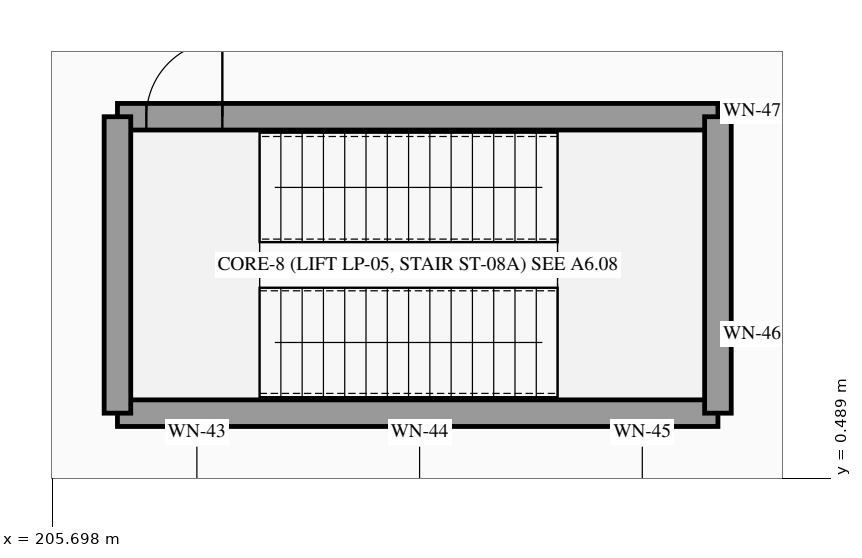
"""IFC4 building model, lengths in metres.
Left out: names, types, materials, properties, quantities, classifications, styles, units other than length and angle.
Written with IfcOpenShell. Run it as: python <this file> out.ifc"""

import sys

from ifc_helpers import new_model, si_unit, direction, frame, frame_2d, origin, place, context, subcontext, project, spatial, rectangle, extrude, element, fill, save


model = new_model("IFC4")
c1 = context("Model", 3, precision=1e-05, world=origin(), true_north=direction((0.0, 1.0)))
c2 = subcontext(c1, "Body", "Model", "MODEL_VIEW")
j1 = project(units=[si_unit("LENGTHUNIT", "METRE"), si_unit("PLANEANGLEUNIT", "RADIAN")], contexts=[c1])
p1 = place(None, origin())
s1 = spatial("IfcSite", under=j1, at=p1, CompositionType="ELEMENT")
p2 = place(p1, origin())
s2 = spatial("IfcBuilding", under=s1, at=p2, CompositionType="ELEMENT")
p3 = place(p2, origin())
s3 = spatial("IfcBuildingStorey", under=s2, at=p3, CompositionType="ELEMENT", Elevation=0.0)
p4 = place(p3, frame((206.55, 1.35, 0.0), z_axis=(0.0, 0.0, 1.0), x_axis=(1.0, 0.0, 0.0)))
e1 = element("IfcWall", 1, at=p4, inside=s3, PredefinedType="SHEAR", context=c2, shape_type="SweptSolid", body=[
    extrude(rectangle(XDim=7.9, YDim=0.35, at=frame_2d((3.95, 0.0))), origin(), (0.0, 0.0, 1.0), 5.4),
])
p5 = place(p3, frame((206.55, 5.25, 0.0), z_axis=(0.0, 0.0, 1.0), x_axis=(1.0, 0.0, 0.0)))
e2 = element("IfcWall", 2, at=p5, inside=s3, PredefinedType="SHEAR", context=c2, shape_type="SweptSolid", body=[
    extrude(rectangle(XDim=7.9, YDim=0.35, at=frame_2d((3.95, 0.0))), origin(), (0.0, 0.0, 1.0), 5.4),
])
p6 = place(p5, frame((0.38, 0.0, 0.0)))
e3 = element("IfcOpeningElement", 3, at=p6, cuts=e2, PredefinedType="OPENING", context=c2, shape_type="SweptSolid", body=[
    extrude(rectangle(XDim=1.0, YDim=2.15, at=frame_2d((0.5, 1.075))), frame((0.0, 0.185, 0.0), z_axis=(0.0, -1.0, 0.0), x_axis=(1.0, 0.0, 0.0)), (0.0, 0.0, 1.0), 0.37),
])
for number, where, z_axis, x_axis in (
    (4, (206.55, 1.35, 0.0), (0.0, 0.0, 1.0), (0.0, 1.0, 0.0)),
    (5, (214.45, 1.35, 0.0), (0.0, 0.0, 1.0), (0.0, 1.0, 0.0)),
):
    element("IfcWall", number, at=place(p3, frame(where, z_axis=z_axis, x_axis=x_axis)), inside=s3, PredefinedType="SHEAR", context=c2, shape_type="SweptSolid", body=[
        extrude(rectangle(XDim=3.9, YDim=0.35, at=frame_2d((1.95, 0.0))), origin(), (0.0, 0.0, 1.0), 5.4),
    ])
p7 = place(p6, frame((1.0, 0.0, 0.0), z_axis=(0.0, 0.0, 1.0), x_axis=(-1.0, 0.0, 0.0)))
e6 = element("IfcDoor", 6, at=p7, inside=s3, OperationType="SINGLE_SWING_RIGHT", PredefinedType="DOOR", context=c2, shape_type="SweptSolid", body=[
    extrude(rectangle(XDim=1.0, YDim=2.15, at=frame_2d((0.5, 1.075))), frame((0.0, 0.025, 0.0), z_axis=(0.0, -1.0, 0.0), x_axis=(1.0, 0.0, 0.0)), (0.0, 0.0, 1.0), 0.05),
])
fill(e3, e6)
save(model, sys.argv[1])
